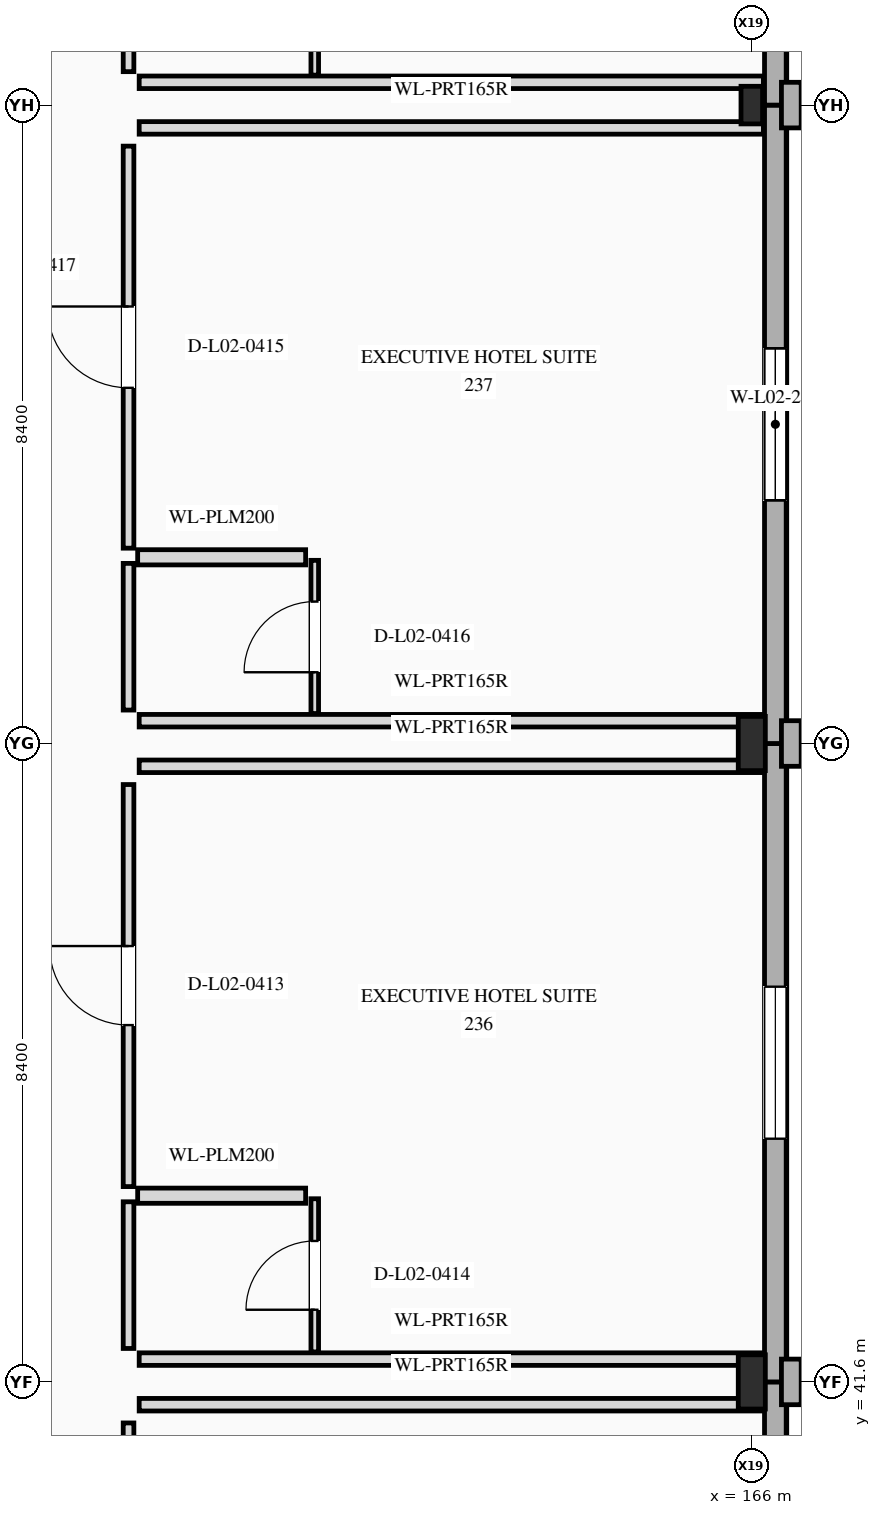
"""IFC4 building model, lengths in metres.
Left out: names, types, materials, properties, quantities, classifications, styles, units other than length and angle.
Written with IfcOpenShell. Run it as: python <this file> out.ifc"""

import sys

from ifc_helpers import new_model, si_unit, direction, frame, frame_2d, origin, origin_2d, place, context, subcontext, project, spatial, rectangle, i_section, extrude, element, fill, save


model = new_model("IFC4")
c1 = context("Model", 3, precision=1e-05, world=origin(), true_north=direction((0.0, 1.0)))
c2 = subcontext(c1, "Body", "Model", "MODEL_VIEW")
j1 = project(units=[si_unit("LENGTHUNIT", "METRE"), si_unit("PLANEANGLEUNIT", "RADIAN")], contexts=[c1])
p1 = place(None, origin())
s1 = spatial("IfcSite", under=j1, at=p1, CompositionType="ELEMENT")
p2 = place(p1, origin())
s2 = spatial("IfcBuilding", under=s1, at=p2, CompositionType="ELEMENT")
p3 = place(p2, frame((0.0, 0.0, 10.8)))
s3 = spatial("IfcBuildingStorey", under=s2, at=p3, CompositionType="ELEMENT", Elevation=10.8)
for number, where, z_axis, x_axis in (
    (1, (166.0, 41.6, 0.0), (0.0, 0.0, 1.0), (1.0, 0.0, 0.0)),
    (2, (166.0, 50.0, 0.0), (0.0, 0.0, 1.0), (1.0, 0.0, 0.0)),
):
    element("IfcColumn", number, at=place(p3, frame(where, z_axis=z_axis, x_axis=x_axis)), inside=s3, PredefinedType="COLUMN", context=c2, shape_type="SweptSolid", body=[
        extrude(i_section(OverallWidth=0.356, OverallDepth=0.714, WebThickness=0.019, FlangeThickness=0.034, at=origin_2d()), origin(), (0.0, 0.0, 1.0), 4.8),
    ])
p4 = place(p3, frame((166.0, 58.4, 0.0), z_axis=(0.0, 0.0, 1.0), x_axis=(1.0, 0.0, 0.0)))
e3 = element("IfcColumn", 3, at=p4, inside=s3, PredefinedType="COLUMN", context=c2, shape_type="SweptSolid", body=[
    extrude(i_section(OverallWidth=0.284, OverallDepth=0.495, WebThickness=0.019, FlangeThickness=0.033, at=origin_2d()), origin(), (0.0, 0.0, 1.0), 4.8),
])
p5 = place(p3, frame((166.31, 33.2, 0.0), z_axis=(0.0, 0.0, 1.0), x_axis=(0.0, 1.0, 0.0)))
e4 = element("IfcWall", 4, at=p5, inside=s3, PredefinedType="STANDARD", context=c2, shape_type="SweptSolid", body=[
    extrude(rectangle(XDim=8.4, YDim=0.285, at=frame_2d((4.2, 0.0))), origin(), (0.0, 0.0, 1.0), 4.8),
])
p6 = place(p5, frame((3.2, 0.0, 0.85)))
e5 = element("IfcOpeningElement", 5, at=p6, cuts=e4, PredefinedType="OPENING", context=c2, shape_type="SweptSolid", body=[
    extrude(rectangle(XDim=2.0, YDim=1.65, at=frame_2d((1.0, 0.825))), frame((0.0, 0.152, 0.0), z_axis=(0.0, -1.0, 0.0), x_axis=(1.0, 0.0, 0.0)), (0.0, 0.0, 1.0), 0.305),
])
p7 = place(p3, frame((166.31, 41.6, 0.0), z_axis=(0.0, 0.0, 1.0), x_axis=(0.0, 1.0, 0.0)))
e6 = element("IfcWall", 6, at=p7, inside=s3, PredefinedType="STANDARD", context=c2, shape_type="SweptSolid", body=[
    extrude(rectangle(XDim=8.4, YDim=0.285, at=frame_2d((4.2, 0.0))), origin(), (0.0, 0.0, 1.0), 4.8),
])
p8 = place(p7, frame((3.2, 0.0, 0.85)))
e7 = element("IfcOpeningElement", 7, at=p8, cuts=e6, PredefinedType="OPENING", context=c2, shape_type="SweptSolid", body=[
    extrude(rectangle(XDim=2.0, YDim=1.65, at=frame_2d((1.0, 0.825))), frame((0.0, 0.152, 0.0), z_axis=(0.0, -1.0, 0.0), x_axis=(1.0, 0.0, 0.0)), (0.0, 0.0, 1.0), 0.305),
])
p9 = place(p3, frame((166.52, 41.3, 0.0), z_axis=(0.0, 0.0, 1.0), x_axis=(0.0, 1.0, 0.0)))
e8 = element("IfcWall", 8, at=p9, inside=s3, PredefinedType="ELEMENTEDWALL", context=c2, shape_type="SweptSolid", body=[
    extrude(rectangle(XDim=0.6, YDim=0.26, at=frame_2d((0.3, 0.0))), origin(), (0.0, 0.0, 1.0), 4.8),
])
p10 = place(p3, frame((166.31, 50.0, 0.0), z_axis=(0.0, 0.0, 1.0), x_axis=(0.0, 1.0, 0.0)))
e9 = element("IfcWall", 9, at=p10, inside=s3, PredefinedType="STANDARD", context=c2, shape_type="SweptSolid", body=[
    extrude(rectangle(XDim=8.4, YDim=0.285, at=frame_2d((4.2, 0.0))), origin(), (0.0, 0.0, 1.0), 4.8),
])
p11 = place(p10, frame((3.2, 0.0, 0.85)))
e10 = element("IfcOpeningElement", 10, at=p11, cuts=e9, PredefinedType="OPENING", context=c2, shape_type="SweptSolid", body=[
    extrude(rectangle(XDim=2.0, YDim=1.65, at=frame_2d((1.0, 0.825))), frame((0.0, 0.152, 0.0), z_axis=(0.0, -1.0, 0.0), x_axis=(1.0, 0.0, 0.0)), (0.0, 0.0, 1.0), 0.305),
])
p12 = place(p3, frame((166.52, 49.7, 0.0), z_axis=(0.0, 0.0, 1.0), x_axis=(0.0, 1.0, 0.0)))
e11 = element("IfcWall", 11, at=p12, inside=s3, PredefinedType="ELEMENTEDWALL", context=c2, shape_type="SweptSolid", body=[
    extrude(rectangle(XDim=0.6, YDim=0.26, at=frame_2d((0.3, 0.0))), origin(), (0.0, 0.0, 1.0), 4.8),
])
p13 = place(p3, frame((166.31, 58.4, 0.0), z_axis=(0.0, 0.0, 1.0), x_axis=(0.0, 1.0, 0.0)))
e12 = element("IfcWall", 12, at=p13, inside=s3, PredefinedType="STANDARD", context=c2, shape_type="SweptSolid", body=[
    extrude(rectangle(XDim=8.71, YDim=0.285, at=frame_2d((4.355, 0.0))), origin(), (0.0, 0.0, 1.0), 4.8),
])
p14 = place(p13, frame((3.45, 0.0, 0.85)))
e13 = element("IfcOpeningElement", 13, at=p14, cuts=e12, PredefinedType="OPENING", context=c2, shape_type="SweptSolid", body=[
    extrude(rectangle(XDim=1.5, YDim=1.7, at=frame_2d((0.75, 0.85))), frame((0.0, 0.152, 0.0), z_axis=(0.0, -1.0, 0.0), x_axis=(1.0, 0.0, 0.0)), (0.0, 0.0, 1.0), 0.305),
])
p15 = place(p3, frame((166.52, 58.1, 0.0), z_axis=(0.0, 0.0, 1.0), x_axis=(0.0, 1.0, 0.0)))
e14 = element("IfcWall", 14, at=p15, inside=s3, PredefinedType="ELEMENTEDWALL", context=c2, shape_type="SweptSolid", body=[
    extrude(rectangle(XDim=0.6, YDim=0.26, at=frame_2d((0.3, 0.0))), origin(), (0.0, 0.0, 1.0), 4.8),
])
p16 = place(p3, frame((157.8, 35.77, 0.0), z_axis=(0.0, 0.0, 1.0), x_axis=(0.0, 1.0, 0.0)))
e15 = element("IfcWall", 15, at=p16, inside=s3, PredefinedType="PARTITIONING", context=c2, shape_type="SweptSolid", body=[
    extrude(rectangle(XDim=5.29, YDim=0.14, at=frame_2d((2.645, 0.0))), origin(), (0.0, 0.0, 1.0), 4.475),
])
p17 = place(p16, frame((2.155, 0.0, 0.0)))
e16 = element("IfcOpeningElement", 16, at=p17, cuts=e15, PredefinedType="OPENING", context=c2, shape_type="SweptSolid", body=[
    extrude(rectangle(XDim=0.98, YDim=2.2, at=frame_2d((0.49, 1.1))), frame((0.0, 0.08, 0.0), z_axis=(0.0, -1.0, 0.0), x_axis=(1.0, 0.0, 0.0)), (0.0, 0.0, 1.0), 0.16),
])
p18 = place(p3, frame((157.94, 41.3, 0.0), z_axis=(0.0, 0.0, 1.0), x_axis=(1.0, 0.0, 0.0)))
e17 = element("IfcWall", 17, at=p18, inside=s3, PredefinedType="PARTITIONING", context=c2, shape_type="SweptSolid", body=[
    extrude(rectangle(XDim=8.213, YDim=0.165, at=frame_2d((4.106, 0.0))), origin(), (0.0, 0.0, 1.0), 3.865),
])
p19 = place(p3, frame((157.8, 42.04, 0.0), z_axis=(0.0, 0.0, 1.0), x_axis=(0.0, 1.0, 0.0)))
e18 = element("IfcWall", 18, at=p19, inside=s3, PredefinedType="PARTITIONING", context=c2, shape_type="SweptSolid", body=[
    extrude(rectangle(XDim=1.93, YDim=0.14, at=frame_2d((0.965, 0.0))), origin(), (0.0, 0.0, 1.0), 4.028),
])
p20 = place(p3, frame((157.8, 44.17, 0.0), z_axis=(0.0, 0.0, 1.0), x_axis=(0.0, 1.0, 0.0)))
e19 = element("IfcWall", 19, at=p20, inside=s3, PredefinedType="PARTITIONING", context=c2, shape_type="SweptSolid", body=[
    extrude(rectangle(XDim=5.29, YDim=0.14, at=frame_2d((2.645, 0.0))), origin(), (0.0, 0.0, 1.0), 4.028),
])
p21 = place(p20, frame((2.125, 0.0, 0.0)))
e20 = element("IfcOpeningElement", 20, at=p21, cuts=e19, PredefinedType="OPENING", context=c2, shape_type="SweptSolid", body=[
    extrude(rectangle(XDim=1.04, YDim=2.25, at=frame_2d((0.52, 1.125))), frame((0.0, 0.08, 0.0), z_axis=(0.0, -1.0, 0.0), x_axis=(1.0, 0.0, 0.0)), (0.0, 0.0, 1.0), 0.16),
])
for number, where, z_axis, x_axis in (
    (21, (157.94, 41.9, 0.0), (0.0, 0.0, 1.0), (1.0, 0.0, 0.0)),
    (22, (157.94, 49.7, 0.0), (0.0, 0.0, 1.0), (1.0, 0.0, 0.0)),
):
    element("IfcWall", number, at=place(p3, frame(where, z_axis=z_axis, x_axis=x_axis)), inside=s3, PredefinedType="PARTITIONING", context=c2, shape_type="SweptSolid", body=[
        extrude(rectangle(XDim=8.213, YDim=0.165, at=frame_2d((4.106, 0.0))), origin(), (0.0, 0.0, 1.0), 3.865),
    ])
p22 = place(p3, frame((157.92, 44.05, 0.0), z_axis=(0.0, 0.0, 1.0), x_axis=(1.0, 0.0, 0.0)))
e23 = element("IfcWall", 23, at=p22, inside=s3, PredefinedType="PLUMBINGWALL", context=c2, shape_type="SweptSolid", body=[
    extrude(rectangle(XDim=2.21, YDim=0.2, at=frame_2d((1.105, 0.0))), origin(), (0.0, 0.0, 1.0), 4.475),
])
p23 = place(p3, frame((160.25, 41.994, 0.0), z_axis=(0.0, 0.0, 1.0), x_axis=(0.0, 1.0, 0.0)))
e24 = element("IfcWall", 24, at=p23, inside=s3, PredefinedType="PARTITIONING", context=c2, shape_type="SweptSolid", body=[
    extrude(rectangle(XDim=2.016, YDim=0.1, at=frame_2d((1.008, 0.0))), origin(), (0.0, 0.0, 1.0), 4.028),
])
p24 = place(p23, frame((0.555, 0.0, 0.0)))
e25 = element("IfcOpeningElement", 25, at=p24, cuts=e24, PredefinedType="OPENING", context=c2, shape_type="SweptSolid", body=[
    extrude(rectangle(XDim=0.905, YDim=2.18, at=frame_2d((0.453, 1.09))), frame((0.0, 0.06, 0.0), z_axis=(0.0, -1.0, 0.0), x_axis=(1.0, 0.0, 0.0)), (0.0, 0.0, 1.0), 0.12),
])
p25 = place(p3, frame((157.8, 50.44, 0.0), z_axis=(0.0, 0.0, 1.0), x_axis=(0.0, 1.0, 0.0)))
e26 = element("IfcWall", 26, at=p25, inside=s3, PredefinedType="PARTITIONING", context=c2, shape_type="SweptSolid", body=[
    extrude(rectangle(XDim=1.93, YDim=0.14, at=frame_2d((0.965, 0.0))), origin(), (0.0, 0.0, 1.0), 4.475),
])
p26 = place(p3, frame((157.8, 52.57, 0.0), z_axis=(0.0, 0.0, 1.0), x_axis=(0.0, 1.0, 0.0)))
e27 = element("IfcWall", 27, at=p26, inside=s3, PredefinedType="PARTITIONING", context=c2, shape_type="SweptSolid", body=[
    extrude(rectangle(XDim=5.29, YDim=0.14, at=frame_2d((2.645, 0.0))), origin(), (0.0, 0.0, 1.0), 4.475),
])
p27 = place(p26, frame((2.11, 0.0, 0.0)))
e28 = element("IfcOpeningElement", 28, at=p27, cuts=e27, PredefinedType="OPENING", context=c2, shape_type="SweptSolid", body=[
    extrude(rectangle(XDim=1.07, YDim=2.25, at=frame_2d((0.535, 1.125))), frame((0.0, 0.08, 0.0), z_axis=(0.0, -1.0, 0.0), x_axis=(1.0, 0.0, 0.0)), (0.0, 0.0, 1.0), 0.16),
])
for number, where, z_axis, x_axis in (
    (29, (157.94, 50.3, 0.0), (0.0, 0.0, 1.0), (1.0, 0.0, 0.0)),
    (30, (157.94, 58.1, 0.0), (0.0, 0.0, 1.0), (1.0, 0.0, 0.0)),
):
    element("IfcWall", number, at=place(p3, frame(where, z_axis=z_axis, x_axis=x_axis)), inside=s3, PredefinedType="PARTITIONING", context=c2, shape_type="SweptSolid", body=[
        extrude(rectangle(XDim=8.213, YDim=0.165, at=frame_2d((4.106, 0.0))), origin(), (0.0, 0.0, 1.0), 3.865),
    ])
p28 = place(p3, frame((157.92, 52.45, 0.0), z_axis=(0.0, 0.0, 1.0), x_axis=(1.0, 0.0, 0.0)))
e31 = element("IfcWall", 31, at=p28, inside=s3, PredefinedType="PLUMBINGWALL", context=c2, shape_type="SweptSolid", body=[
    extrude(rectangle(XDim=2.21, YDim=0.2, at=frame_2d((1.105, 0.0))), origin(), (0.0, 0.0, 1.0), 4.475),
])
p29 = place(p3, frame((160.25, 50.395, 0.0), z_axis=(0.0, 0.0, 1.0), x_axis=(0.0, 1.0, 0.0)))
e32 = element("IfcWall", 32, at=p29, inside=s3, PredefinedType="PARTITIONING", context=c2, shape_type="SweptSolid", body=[
    extrude(rectangle(XDim=2.015, YDim=0.1, at=frame_2d((1.008, 0.0))), origin(), (0.0, 0.0, 1.0), 4.475),
])
p30 = place(p29, frame((0.543, 0.0, 0.0)))
e33 = element("IfcOpeningElement", 33, at=p30, cuts=e32, PredefinedType="OPENING", context=c2, shape_type="SweptSolid", body=[
    extrude(rectangle(XDim=0.93, YDim=2.22, at=frame_2d((0.465, 1.11))), frame((0.0, 0.06, 0.0), z_axis=(0.0, -1.0, 0.0), x_axis=(1.0, 0.0, 0.0)), (0.0, 0.0, 1.0), 0.12),
])
p31 = place(p3, frame((157.8, 58.84, 0.0), z_axis=(0.0, 0.0, 1.0), x_axis=(0.0, 1.0, 0.0)))
e34 = element("IfcWall", 34, at=p31, inside=s3, PredefinedType="PARTITIONING", context=c2, shape_type="SweptSolid", body=[
    extrude(rectangle(XDim=1.93, YDim=0.14, at=frame_2d((0.965, 0.0))), origin(), (0.0, 0.0, 1.0), 4.033),
])
p32 = place(p3, frame((157.94, 58.7, 0.0), z_axis=(0.0, 0.0, 1.0), x_axis=(1.0, 0.0, 0.0)))
e35 = element("IfcWall", 35, at=p32, inside=s3, PredefinedType="PARTITIONING", context=c2, shape_type="SweptSolid", body=[
    extrude(rectangle(XDim=8.213, YDim=0.165, at=frame_2d((4.106, 0.0))), origin(), (0.0, 0.0, 1.0), 3.865),
])
p33 = place(p3, frame((160.25, 58.794, 0.0), z_axis=(0.0, 0.0, 1.0), x_axis=(0.0, 1.0, 0.0)))
e36 = element("IfcWall", 36, at=p33, inside=s3, PredefinedType="PARTITIONING", context=c2, shape_type="SweptSolid", body=[
    extrude(rectangle(XDim=2.016, YDim=0.1, at=frame_2d((1.008, 0.0))), origin(), (0.0, 0.0, 1.0), 4.033),
])
p34 = place(p33, frame((0.568, 0.0, 0.0)))
e37 = element("IfcOpeningElement", 37, at=p34, cuts=e36, PredefinedType="OPENING", context=c2, shape_type="SweptSolid", body=[
    extrude(rectangle(XDim=0.88, YDim=2.1, at=frame_2d((0.44, 1.05))), frame((0.0, 0.06, 0.0), z_axis=(0.0, -1.0, 0.0), x_axis=(1.0, 0.0, 0.0)), (0.0, 0.0, 1.0), 0.12),
])
p35 = place(p8, origin())
e38 = element("IfcWindow", 38, at=p35, inside=s3, PartitioningType="SINGLE_PANEL", PredefinedType="WINDOW", context=c2, shape_type="SweptSolid", body=[
    extrude(rectangle(XDim=2.0, YDim=1.65, at=frame_2d((1.0, 0.825))), frame((0.0, 0.03, 0.0), z_axis=(0.0, -1.0, 0.0), x_axis=(1.0, 0.0, 0.0)), (0.0, 0.0, 1.0), 0.06),
])
fill(e7, e38)
p36 = place(p11, origin())
e39 = element("IfcWindow", 39, at=p36, inside=s3, PartitioningType="SINGLE_PANEL", PredefinedType="WINDOW", context=c2, shape_type="SweptSolid", body=[
    extrude(rectangle(XDim=2.0, YDim=1.65, at=frame_2d((1.0, 0.825))), frame((0.0, 0.03, 0.0), z_axis=(0.0, -1.0, 0.0), x_axis=(1.0, 0.0, 0.0)), (0.0, 0.0, 1.0), 0.06),
])
fill(e10, e39)
p37 = place(p21, origin())
e40 = element("IfcDoor", 40, at=p37, inside=s3, OperationType="SINGLE_SWING_RIGHT", PredefinedType="DOOR", context=c2, shape_type="SweptSolid", body=[
    extrude(rectangle(XDim=1.04, YDim=2.25, at=frame_2d((0.52, 1.125))), frame((0.0, 0.025, 0.0), z_axis=(0.0, -1.0, 0.0), x_axis=(1.0, 0.0, 0.0)), (0.0, 0.0, 1.0), 0.05),
])
fill(e20, e40)
p38 = place(p24, origin())
e41 = element("IfcDoor", 41, at=p38, inside=s3, OperationType="SINGLE_SWING_LEFT", PredefinedType="DOOR", context=c2, shape_type="SweptSolid", body=[
    extrude(rectangle(XDim=0.905, YDim=2.18, at=frame_2d((0.453, 1.09))), frame((0.0, 0.025, 0.0), z_axis=(0.0, -1.0, 0.0), x_axis=(1.0, 0.0, 0.0)), (0.0, 0.0, 1.0), 0.05),
])
fill(e25, e41)
p39 = place(p27, origin())
e42 = element("IfcDoor", 42, at=p39, inside=s3, OperationType="SINGLE_SWING_RIGHT", PredefinedType="DOOR", context=c2, shape_type="SweptSolid", body=[
    extrude(rectangle(XDim=1.07, YDim=2.25, at=frame_2d((0.535, 1.125))), frame((0.0, 0.025, 0.0), z_axis=(0.0, -1.0, 0.0), x_axis=(1.0, 0.0, 0.0)), (0.0, 0.0, 1.0), 0.05),
])
fill(e28, e42)
p40 = place(p30, origin())
e43 = element("IfcDoor", 43, at=p40, inside=s3, OperationType="SINGLE_SWING_LEFT", PredefinedType="DOOR", context=c2, shape_type="SweptSolid", body=[
    extrude(rectangle(XDim=0.93, YDim=2.22, at=frame_2d((0.465, 1.11))), frame((0.0, 0.025, 0.0), z_axis=(0.0, -1.0, 0.0), x_axis=(1.0, 0.0, 0.0)), (0.0, 0.0, 1.0), 0.05),
])
fill(e33, e43)
save(model, sys.argv[1])
